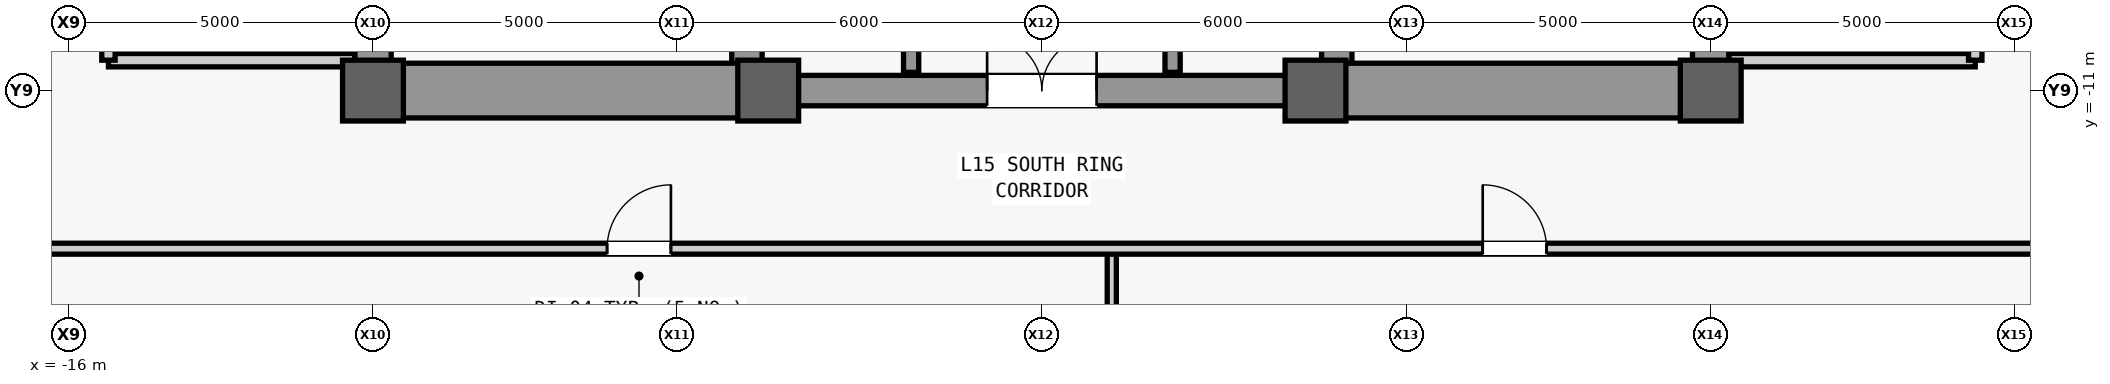
"""IFC4 building model, lengths in metres.
Left out: names, types, materials, properties, quantities, classifications, styles, units other than length and angle.
Written with IfcOpenShell. Run it as: python <this file> out.ifc"""

import sys

from ifc_helpers import new_model, si_unit, direction, frame, frame_2d, origin, origin_2d, place, context, subcontext, project, spatial, rectangle, extrude, source, transform, mapped, element, fill, save


model = new_model("IFC4")
c1 = context("Model", 3, precision=1e-05, world=origin(), true_north=direction((0.0, 1.0)))
c2 = subcontext(c1, "Body", "Model", "MODEL_VIEW")
j1 = project(units=[si_unit("LENGTHUNIT", "METRE"), si_unit("PLANEANGLEUNIT", "RADIAN")], contexts=[c1])
p1 = place(None, origin())
s1 = spatial("IfcSite", under=j1, at=p1, CompositionType="ELEMENT")
p2 = place(p1, origin())
s2 = spatial("IfcBuilding", under=s1, at=p2, CompositionType="ELEMENT")
p3 = place(p2, frame((0.0, 0.0, 70.4)))
s3 = spatial("IfcBuildingStorey", under=s2, at=p3, CompositionType="ELEMENT", Elevation=70.4)
m1 = source(origin(), c2, "Body", "SweptSolid", [
    extrude(rectangle(XDim=22.0, YDim=0.6, at=frame_2d((11.0, 0.0))), origin(), (0.0, 0.0, 1.0), 3.94),
])
p4 = place(p3, frame((-11.0, -11.0, 0.0), z_axis=(0.0, 0.0, 1.0), x_axis=(0.0, 1.0, 0.0)))
e1 = element("IfcWall", 1, at=p4, inside=s3, PredefinedType="SHEAR", context=c2, shape_type="MappedRepresentation", body=[
    mapped(m1, transform((0.0, 0.0, 0.0), scale=1.0)),
])
m2 = source(origin(), c2, "Body", "SweptSolid", [
    extrude(rectangle(XDim=1.1, YDim=2.2, at=frame_2d((0.55, 1.1))), frame((0.0, 0.31, 0.0), z_axis=(0.0, -1.0, 0.0), x_axis=(1.0, 0.0, 0.0)), (0.0, 0.0, 1.0), 0.62),
])
p5 = place(p4, frame((0.8, 0.0, 0.0)))
e2 = element("IfcOpeningElement", 2, at=p5, cuts=e1, PredefinedType="OPENING", context=c2, shape_type="MappedRepresentation", body=[
    mapped(m2, transform((0.0, 0.0, 0.0), scale=1.0)),
])
p6 = place(p4, frame((12.5, 0.0, 0.0)))
e3 = element("IfcOpeningElement", 3, at=p6, cuts=e1, PredefinedType="OPENING", context=c2, shape_type="MappedRepresentation", body=[
    mapped(m2, transform((0.0, 0.0, 0.0), scale=1.0)),
])
m3 = source(origin(), c2, "Body", "SweptSolid", [
    extrude(rectangle(XDim=0.9, YDim=2.15, at=frame_2d((0.45, 1.075))), frame((0.0, 0.31, 0.0), z_axis=(0.0, -1.0, 0.0), x_axis=(1.0, 0.0, 0.0)), (0.0, 0.0, 1.0), 0.62),
])
p7 = place(p4, frame((7.575, 0.0, 0.0)))
e4 = element("IfcOpeningElement", 4, at=p7, cuts=e1, PredefinedType="OPENING", context=c2, shape_type="MappedRepresentation", body=[
    mapped(m3, transform((0.0, 0.0, 0.0), scale=1.0)),
])
m4 = source(origin(), c2, "Body", "SweptSolid", [
    extrude(rectangle(XDim=1.3, YDim=2.3, at=frame_2d((0.65, 1.15))), frame((0.0, 0.31, 0.0), z_axis=(0.0, -1.0, 0.0), x_axis=(1.0, 0.0, 0.0)), (0.0, 0.0, 1.0), 0.62),
])
p8 = place(p4, frame((2.7, 0.0, 0.0)))
e5 = element("IfcOpeningElement", 5, at=p8, cuts=e1, PredefinedType="OPENING", context=c2, shape_type="MappedRepresentation", body=[
    mapped(m4, transform((0.0, 0.0, 0.0), scale=1.0)),
])
p9 = place(p3, frame((11.0, -11.0, 0.0), z_axis=(0.0, 0.0, 1.0), x_axis=(0.0, 1.0, 0.0)))
e6 = element("IfcWall", 6, at=p9, inside=s3, PredefinedType="SHEAR", context=c2, shape_type="MappedRepresentation", body=[
    mapped(m1, transform((0.0, 0.0, 0.0), scale=1.0)),
])
p10 = place(p9, frame((0.8, 0.0, 0.0)))
e7 = element("IfcOpeningElement", 7, at=p10, cuts=e6, PredefinedType="OPENING", context=c2, shape_type="MappedRepresentation", body=[
    mapped(m2, transform((0.0, 0.0, 0.0), scale=1.0)),
])
p11 = place(p9, frame((7.575, 0.0, 0.0)))
e8 = element("IfcOpeningElement", 8, at=p11, cuts=e6, PredefinedType="OPENING", context=c2, shape_type="MappedRepresentation", body=[
    mapped(m3, transform((0.0, 0.0, 0.0), scale=1.0)),
])
p12 = place(p9, frame((2.7, 0.0, 0.0)))
e9 = element("IfcOpeningElement", 9, at=p12, cuts=e6, PredefinedType="OPENING", context=c2, shape_type="MappedRepresentation", body=[
    mapped(m4, transform((0.0, 0.0, 0.0), scale=1.0)),
])
p13 = place(p9, frame((13.35, 0.0, 0.0)))
e10 = element("IfcOpeningElement", 10, at=p13, cuts=e6, PredefinedType="OPENING", context=c2, shape_type="MappedRepresentation", body=[
    mapped(m4, transform((0.0, 0.0, 0.0), scale=1.0)),
])
m5 = source(origin(), c2, "Body", "SweptSolid", [
    extrude(rectangle(XDim=21.4, YDim=0.5, at=frame_2d((10.7, 0.0))), origin(), (0.0, 0.0, 1.0), 3.94),
])
for number, where, z_axis, x_axis in (
    (11, (-4.85, -10.7, 0.0), (0.0, 0.0, 1.0), (0.0, 1.0, 0.0)),
    (12, (4.85, -10.7, 0.0), (0.0, 0.0, 1.0), (0.0, 1.0, 0.0)),
):
    element("IfcWall", number, at=place(p3, frame(where, z_axis=z_axis, x_axis=x_axis)), inside=s3, PredefinedType="SHEAR", context=c2, shape_type="MappedRepresentation", body=[
        mapped(m5, transform((0.0, 0.0, 0.0), scale=1.0)),
    ])
m6 = source(origin(), c2, "Body", "SweptSolid", [
    extrude(rectangle(XDim=5.85, YDim=0.9, at=frame_2d((2.925, 0.0))), origin(), (0.0, 0.0, 1.0), 3.94),
])
for number, where, z_axis, x_axis in (
    (13, (-10.7, -11.0, 0.0), (0.0, 0.0, 1.0), (1.0, 0.0, 0.0)),
    (14, (4.85, -11.0, 0.0), (0.0, 0.0, 1.0), (1.0, 0.0, 0.0)),
):
    element("IfcWall", number, at=place(p3, frame(where, z_axis=z_axis, x_axis=x_axis)), inside=s3, PredefinedType="SHEAR", context=c2, shape_type="MappedRepresentation", body=[
        mapped(m6, transform((0.0, 0.0, 0.0), scale=1.0)),
    ])
m7 = source(origin(), c2, "Body", "SweptSolid", [
    extrude(rectangle(XDim=9.2, YDim=0.5, at=frame_2d((4.6, 0.0))), origin(), (0.0, 0.0, 1.0), 3.94),
])
p14 = place(p3, frame((-4.6, -11.0, 0.0), z_axis=(0.0, 0.0, 1.0), x_axis=(1.0, 0.0, 0.0)))
e15 = element("IfcWall", 15, at=p14, inside=s3, PredefinedType="SHEAR", context=c2, shape_type="MappedRepresentation", body=[
    mapped(m7, transform((0.0, 0.0, 0.0), scale=1.0)),
])
m8 = source(origin(), c2, "Body", "SweptSolid", [
    extrude(rectangle(XDim=1.8, YDim=2.25, at=frame_2d((0.9, 1.125))), frame((0.0, 0.26, 0.0), z_axis=(0.0, -1.0, 0.0), x_axis=(1.0, 0.0, 0.0)), (0.0, 0.0, 1.0), 0.52),
])
p15 = place(p14, frame((3.7, 0.0, 0.0)))
e16 = element("IfcOpeningElement", 16, at=p15, cuts=e15, PredefinedType="OPENING", context=c2, shape_type="MappedRepresentation", body=[
    mapped(m8, transform((0.0, 0.0, 0.0), scale=1.0)),
])
m9 = source(origin(), c2, "Body", "SweptSolid", [
    extrude(rectangle(XDim=1.0, YDim=1.0, at=origin_2d()), origin(), (0.0, 0.0, 1.0), 4.2),
])
for number, where, z_axis, x_axis in (
    (17, (-11.0, -11.0, 0.0), (0.0, 0.0, 1.0), (1.0, 0.0, 0.0)),
    (18, (-4.5, -11.0, 0.0), (0.0, 0.0, 1.0), (1.0, 0.0, 0.0)),
    (19, (4.5, -11.0, 0.0), (0.0, 0.0, 1.0), (1.0, 0.0, 0.0)),
    (20, (11.0, -11.0, 0.0), (0.0, 0.0, 1.0), (1.0, 0.0, 0.0)),
):
    element("IfcColumn", number, at=place(p3, frame(where, z_axis=z_axis, x_axis=x_axis)), inside=s3, PredefinedType="COLUMN", context=c2, shape_type="MappedRepresentation", body=[
        mapped(m9, transform((0.0, 0.0, 0.0), scale=1.0)),
    ])
m10 = source(origin(), c2, "Body", "SweptSolid", [
    extrude(rectangle(XDim=4.05, YDim=0.22, at=frame_2d((2.025, 0.0))), origin(), (0.0, 0.0, 1.0), 3.94),
])
p16 = place(p3, frame((-15.35, -10.5, 0.0), z_axis=(0.0, 0.0, 1.0), x_axis=(1.0, 0.0, 0.0)))
e21 = element("IfcWall", 21, at=p16, inside=s3, PredefinedType="PARTITIONING", context=c2, shape_type="MappedRepresentation", body=[
    mapped(m10, transform((0.0, 0.0, 0.0), scale=1.0)),
])
m11 = source(origin(), c2, "Body", "SweptSolid", [
    extrude(rectangle(XDim=4.4, YDim=0.22, at=frame_2d((2.2, 0.0))), origin(), (0.0, 0.0, 1.0), 3.94),
])
p17 = place(p3, frame((-15.35, -10.5, 0.0), z_axis=(0.0, 0.0, 1.0), x_axis=(0.0, 1.0, 0.0)))
e22 = element("IfcWall", 22, at=p17, inside=s3, PredefinedType="PARTITIONING", context=c2, shape_type="MappedRepresentation", body=[
    mapped(m11, transform((0.0, 0.0, 0.0), scale=1.0)),
])
m12 = source(origin(), c2, "Body", "SweptSolid", [
    extrude(rectangle(XDim=1.2, YDim=2.2, at=frame_2d((0.6, 1.1))), frame((0.0, 0.12, 0.0), z_axis=(0.0, -1.0, 0.0), x_axis=(1.0, 0.0, 0.0)), (0.0, 0.0, 1.0), 0.24),
])
p18 = place(p17, frame((1.6, 0.0, 0.0)))
e23 = element("IfcOpeningElement", 23, at=p18, cuts=e22, PredefinedType="OPENING", context=c2, shape_type="MappedRepresentation", body=[
    mapped(m12, transform((0.0, 0.0, 0.0), scale=1.0)),
])
p19 = place(p3, frame((11.3, -10.5, 0.0), z_axis=(0.0, 0.0, 1.0), x_axis=(1.0, 0.0, 0.0)))
e24 = element("IfcWall", 24, at=p19, inside=s3, PredefinedType="PARTITIONING", context=c2, shape_type="MappedRepresentation", body=[
    mapped(m10, transform((0.0, 0.0, 0.0), scale=1.0)),
])
p20 = place(p3, frame((15.35, -10.5, 0.0), z_axis=(0.0, 0.0, 1.0), x_axis=(0.0, 1.0, 0.0)))
e25 = element("IfcWall", 25, at=p20, inside=s3, PredefinedType="PARTITIONING", context=c2, shape_type="MappedRepresentation", body=[
    mapped(m11, transform((0.0, 0.0, 0.0), scale=1.0)),
])
p21 = place(p20, frame((1.6, 0.0, 0.0)))
e26 = element("IfcOpeningElement", 26, at=p21, cuts=e25, PredefinedType="OPENING", context=c2, shape_type="MappedRepresentation", body=[
    mapped(m12, transform((0.0, 0.0, 0.0), scale=1.0)),
])
m13 = source(origin(), c2, "Body", "SweptSolid", [
    extrude(rectangle(XDim=5.4, YDim=0.25, at=frame_2d((2.7, 0.0))), origin(), (0.0, 0.0, 1.0), 3.94),
])
p22 = place(p3, frame((-2.15, -10.7, 0.0), z_axis=(0.0, 0.0, 1.0), x_axis=(0.0, 1.0, 0.0)))
e27 = element("IfcWall", 27, at=p22, inside=s3, PredefinedType="SHEAR", context=c2, shape_type="MappedRepresentation", body=[
    mapped(m13, transform((0.0, 0.0, 0.0), scale=1.0)),
])
m14 = source(origin(), c2, "Body", "SweptSolid", [
    extrude(rectangle(XDim=1.2, YDim=2.3, at=frame_2d((0.6, 1.15))), frame((0.0, 0.135, 0.0), z_axis=(0.0, -1.0, 0.0), x_axis=(1.0, 0.0, 0.0)), (0.0, 0.0, 1.0), 0.27),
])
p23 = place(p22, frame((0.9, 0.0, 0.0)))
e28 = element("IfcOpeningElement", 28, at=p23, cuts=e27, PredefinedType="OPENING", context=c2, shape_type="MappedRepresentation", body=[
    mapped(m14, transform((0.0, 0.0, 0.0), scale=1.0)),
])
p24 = place(p22, frame((3.2, 0.0, 0.0)))
e29 = element("IfcOpeningElement", 29, at=p24, cuts=e27, PredefinedType="OPENING", context=c2, shape_type="MappedRepresentation", body=[
    mapped(m14, transform((0.0, 0.0, 0.0), scale=1.0)),
])
p25 = place(p3, frame((2.15, -10.7, 0.0), z_axis=(0.0, 0.0, 1.0), x_axis=(0.0, 1.0, 0.0)))
e30 = element("IfcWall", 30, at=p25, inside=s3, PredefinedType="SHEAR", context=c2, shape_type="MappedRepresentation", body=[
    mapped(m13, transform((0.0, 0.0, 0.0), scale=1.0)),
])
p26 = place(p25, frame((0.9, 0.0, 0.0)))
e31 = element("IfcOpeningElement", 31, at=p26, cuts=e30, PredefinedType="OPENING", context=c2, shape_type="MappedRepresentation", body=[
    mapped(m14, transform((0.0, 0.0, 0.0), scale=1.0)),
])
p27 = place(p25, frame((3.2, 0.0, 0.0)))
e32 = element("IfcOpeningElement", 32, at=p27, cuts=e30, PredefinedType="OPENING", context=c2, shape_type="MappedRepresentation", body=[
    mapped(m14, transform((0.0, 0.0, 0.0), scale=1.0)),
])
m15 = source(origin(), c2, "Body", "SweptSolid", [
    extrude(rectangle(XDim=18.4, YDim=0.15, at=frame_2d((9.2, 0.0))), origin(), (0.0, 0.0, 1.0), 3.94),
])
p28 = place(p3, frame((1.15, -32.0, 0.0), z_axis=(0.0, 0.0, 1.0), x_axis=(0.0, 1.0, 0.0)))
e33 = element("IfcWall", 33, at=p28, inside=s3, PredefinedType="PARTITIONING", context=c2, shape_type="MappedRepresentation", body=[
    mapped(m15, transform((0.0, 0.0, 0.0), scale=1.0)),
])
m16 = source(origin(), c2, "Body", "SweptSolid", [
    extrude(rectangle(XDim=36.25, YDim=0.18, at=frame_2d((18.125, 0.0))), origin(), (0.0, 0.0, 1.0), 3.94),
])
p29 = place(p3, frame((-17.7, -13.6, 0.0), z_axis=(0.0, 0.0, 1.0), x_axis=(1.0, 0.0, 0.0)))
e34 = element("IfcWall", 34, at=p29, inside=s3, PredefinedType="PARTITIONING", context=c2, shape_type="MappedRepresentation", body=[
    mapped(m16, transform((0.0, 0.0, 0.0), scale=1.0)),
])
m17 = source(origin(), c2, "Body", "SweptSolid", [
    extrude(rectangle(XDim=1.05, YDim=2.2, at=frame_2d((0.525, 1.1))), frame((0.0, 0.1, 0.0), z_axis=(0.0, -1.0, 0.0), x_axis=(1.0, 0.0, 0.0)), (0.0, 0.0, 1.0), 0.2),
])
p30 = place(p29, frame((10.55, 0.0, 0.0)))
e35 = element("IfcOpeningElement", 35, at=p30, cuts=e34, PredefinedType="OPENING", context=c2, shape_type="MappedRepresentation", body=[
    mapped(m17, transform((0.0, 0.0, 0.0), scale=1.0)),
])
p31 = place(p29, frame((24.95, 0.0, 0.0)))
e36 = element("IfcOpeningElement", 36, at=p31, cuts=e34, PredefinedType="OPENING", context=c2, shape_type="MappedRepresentation", body=[
    mapped(m17, transform((0.0, 0.0, 0.0), scale=1.0)),
])
m18 = source(origin(), c2, "Body", "SweptSolid", [
    extrude(rectangle(XDim=1.8, YDim=2.25, at=frame_2d((0.9, 1.125))), frame((0.0, 0.025, 0.0), z_axis=(0.0, -1.0, 0.0), x_axis=(1.0, 0.0, 0.0)), (0.0, 0.0, 1.0), 0.05),
])
p32 = place(p15, origin())
e37 = element("IfcDoor", 37, at=p32, inside=s3, OperationType="SINGLE_SWING_LEFT", PredefinedType="DOOR", context=c2, shape_type="MappedRepresentation", body=[
    mapped(m18, transform((0.0, 0.0, 0.0), scale=1.0)),
])
fill(e16, e37)
m19 = source(origin(), c2, "Body", "SweptSolid", [
    extrude(rectangle(XDim=1.05, YDim=2.2, at=frame_2d((0.525, 1.1))), frame((0.0, 0.025, 0.0), z_axis=(0.0, -1.0, 0.0), x_axis=(1.0, 0.0, 0.0)), (0.0, 0.0, 1.0), 0.05),
])
p33 = place(p30, origin())
e38 = element("IfcDoor", 38, at=p33, inside=s3, OperationType="SINGLE_SWING_RIGHT", PredefinedType="DOOR", context=c2, shape_type="MappedRepresentation", body=[
    mapped(m19, transform((0.0, 0.0, 0.0), scale=1.0)),
])
fill(e35, e38)
p34 = place(p31, origin())
e39 = element("IfcDoor", 39, at=p34, inside=s3, OperationType="SINGLE_SWING_LEFT", PredefinedType="DOOR", context=c2, shape_type="MappedRepresentation", body=[
    mapped(m19, transform((0.0, 0.0, 0.0), scale=1.0)),
])
fill(e36, e39)
save(model, sys.argv[1])
